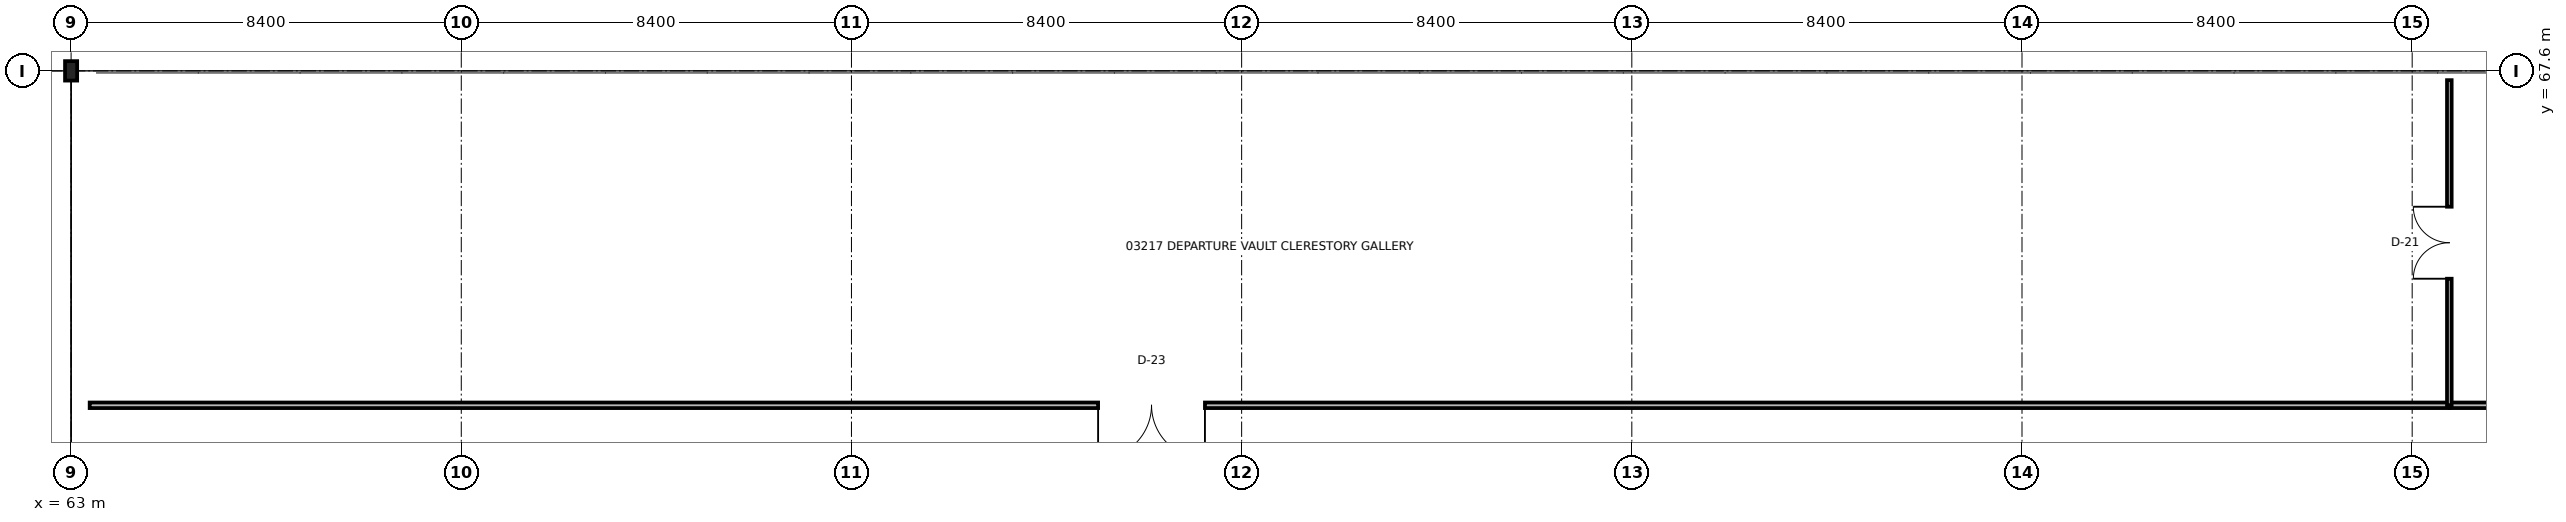
"""IFC4 building model, lengths in metres.
Left out: names, types, materials, properties, quantities, classifications, styles, units other than length and angle.
Written with IfcOpenShell. Run it as: python <this file> out.ifc"""

import sys

from ifc_helpers import new_model, si_unit, direction, frame, frame_2d, origin, origin_2d, place, context, subcontext, project, spatial, rectangle, i_section, extrude, element, fill, save


model = new_model("IFC4")
c1 = context("Model", 3, precision=1e-05, world=origin(), true_north=direction((0.0, 1.0)))
c2 = subcontext(c1, "Body", "Model", "MODEL_VIEW")
j1 = project(units=[si_unit("LENGTHUNIT", "METRE"), si_unit("PLANEANGLEUNIT", "RADIAN")], contexts=[c1])
p1 = place(None, origin())
s1 = spatial("IfcSite", under=j1, at=p1, CompositionType="ELEMENT")
p2 = place(p1, origin())
s2 = spatial("IfcBuilding", under=s1, at=p2, CompositionType="ELEMENT")
p3 = place(p2, frame((0.0, 0.0, 13.8)))
s3 = spatial("IfcBuildingStorey", under=s2, at=p3, CompositionType="ELEMENT", Elevation=13.8)
p4 = place(p3, frame((63.0, 67.6, 0.0), z_axis=(0.0, 0.0, 1.0), x_axis=(1.0, 0.0, 0.0)))
e1 = element("IfcColumn", 1, at=p4, inside=s3, PredefinedType="COLUMN", context=c2, shape_type="SweptSolid", body=[
    extrude(i_section(OverallWidth=0.261, OverallDepth=0.419, WebThickness=0.012, FlangeThickness=0.019, at=origin_2d()), origin(), (0.0, 0.0, 1.0), 6.893),
])
p5 = place(p3, frame((63.4, 60.4, 0.0), z_axis=(0.0, 0.0, 1.0), x_axis=(1.0, 0.0, 0.0)))
e2 = element("IfcWall", 2, at=p5, inside=s3, PredefinedType="PARTITIONING", context=c2, shape_type="SweptSolid", body=[
    extrude(rectangle(XDim=50.8, YDim=0.12, at=frame_2d((25.4, 0.0))), origin(), (0.0, 0.0, 1.0), 3.64),
])
p6 = place(p5, frame((21.71, 0.0, 0.0)))
e3 = element("IfcOpeningElement", 3, at=p6, cuts=e2, PredefinedType="OPENING", context=c2, shape_type="SweptSolid", body=[
    extrude(rectangle(XDim=2.3, YDim=2.45, at=frame_2d((1.15, 1.225))), frame((0.0, 0.07, 0.0), z_axis=(0.0, -1.0, 0.0), x_axis=(1.0, 0.0, 0.0)), (0.0, 0.0, 1.0), 0.14),
])
p7 = place(p3, frame((114.2, 60.4, 0.0), z_axis=(0.0, 0.0, 1.0), x_axis=(1.0, 0.0, 0.0)))
e4 = element("IfcWall", 4, at=p7, inside=s3, PredefinedType="PARTITIONING", context=c2, shape_type="SweptSolid", body=[
    extrude(rectangle(XDim=24.36, YDim=0.12, at=frame_2d((12.18, 0.0))), origin(), (0.0, 0.0, 1.0), 3.64),
])
p8 = place(p7, frame((11.405, 0.0, 0.0)))
e5 = element("IfcOpeningElement", 5, at=p8, cuts=e4, PredefinedType="OPENING", context=c2, shape_type="SweptSolid", body=[
    extrude(rectangle(XDim=1.55, YDim=2.3, at=frame_2d((0.775, 1.15))), frame((0.0, 0.07, 0.0), z_axis=(0.0, -1.0, 0.0), x_axis=(1.0, 0.0, 0.0)), (0.0, 0.0, 1.0), 0.14),
])
p9 = place(p3, frame((114.2, 60.4, 0.0), z_axis=(0.0, 0.0, 1.0), x_axis=(0.0, 1.0, 0.0)))
e6 = element("IfcWall", 6, at=p9, inside=s3, PredefinedType="PARTITIONING", context=c2, shape_type="SweptSolid", body=[
    extrude(rectangle(XDim=7.0, YDim=0.1, at=frame_2d((3.5, 0.0))), origin(), (0.0, 0.0, 1.0), 3.64),
])
p10 = place(p9, frame((2.725, 0.0, 0.0)))
e7 = element("IfcOpeningElement", 7, at=p10, cuts=e6, PredefinedType="OPENING", context=c2, shape_type="SweptSolid", body=[
    extrude(rectangle(XDim=1.55, YDim=2.3, at=frame_2d((0.775, 1.15))), frame((0.0, 0.06, 0.0), z_axis=(0.0, -1.0, 0.0), x_axis=(1.0, 0.0, 0.0)), (0.0, 0.0, 1.0), 0.12),
])
p11 = place(p6, frame((2.3, 0.0, 0.0), z_axis=(0.0, 0.0, 1.0), x_axis=(-1.0, 0.0, 0.0)))
e8 = element("IfcDoor", 8, at=p11, inside=s3, OperationType="DOUBLE_DOOR_SINGLE_SWING", PredefinedType="DOOR", context=c2, shape_type="SweptSolid", body=[
    extrude(rectangle(XDim=2.3, YDim=2.45, at=frame_2d((1.15, 1.225))), frame((0.0, 0.025, 0.0), z_axis=(0.0, -1.0, 0.0), x_axis=(1.0, 0.0, 0.0)), (0.0, 0.0, 1.0), 0.05),
])
fill(e3, e8)
p12 = place(p10, origin())
e9 = element("IfcDoor", 9, at=p12, inside=s3, OperationType="DOUBLE_DOOR_SINGLE_SWING", PredefinedType="DOOR", context=c2, shape_type="SweptSolid", body=[
    extrude(rectangle(XDim=1.55, YDim=2.3, at=frame_2d((0.775, 1.15))), frame((0.0, 0.025, 0.0), z_axis=(0.0, -1.0, 0.0), x_axis=(1.0, 0.0, 0.0)), (0.0, 0.0, 1.0), 0.05),
])
fill(e7, e9)
save(model, sys.argv[1])
